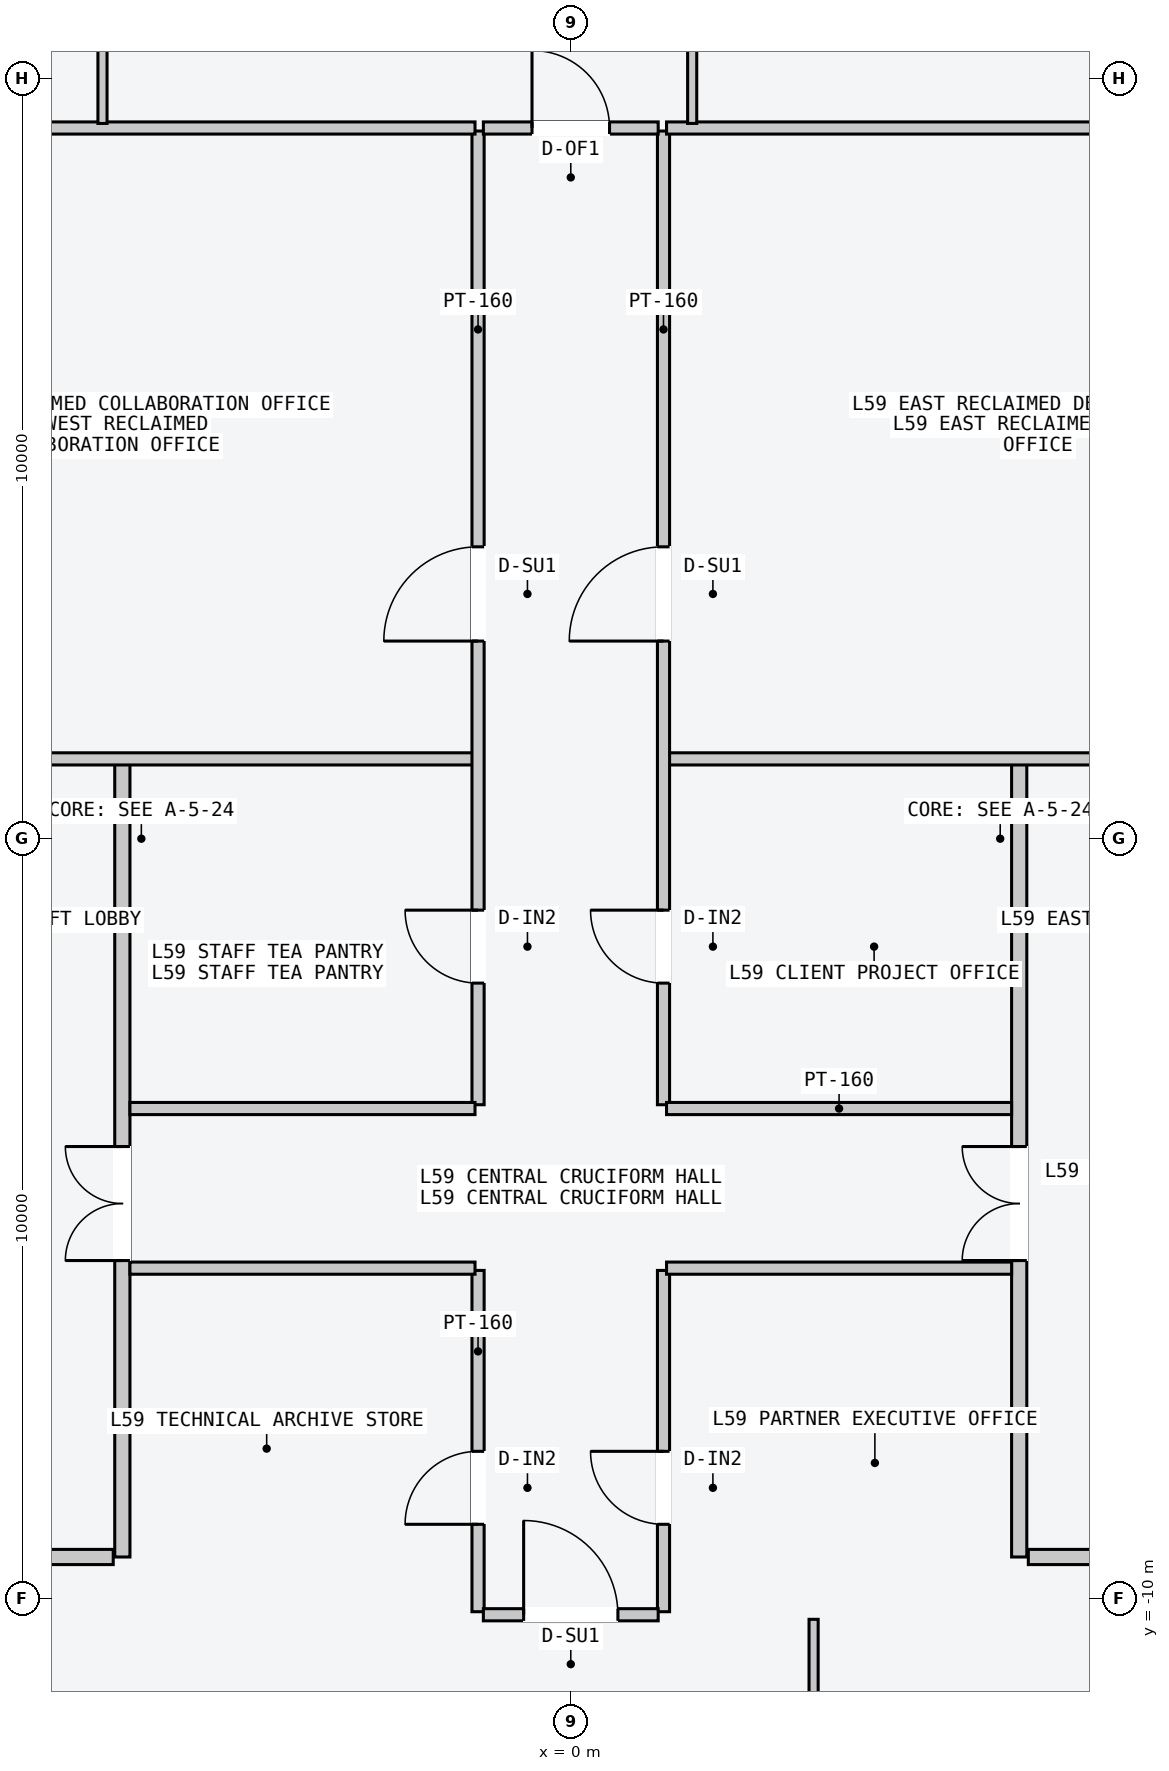
"""IFC4 building model, lengths in metres.
Left out: names, types, materials, properties, quantities, classifications, styles, units other than length and angle.
Written with IfcOpenShell. Run it as: python <this file> out.ifc"""

import sys

from ifc_helpers import new_model, si_unit, direction, frame, frame_2d, origin, place, context, subcontext, project, spatial, rectangle, extrude, element, fill, save


model = new_model("IFC4")
c1 = context("Model", 3, precision=1e-05, world=origin(), true_north=direction((0.0, 1.0)))
c2 = subcontext(c1, "Body", "Model", "MODEL_VIEW")
j1 = project(units=[si_unit("LENGTHUNIT", "METRE"), si_unit("PLANEANGLEUNIT", "RADIAN")], contexts=[c1])
p1 = place(None, origin())
s1 = spatial("IfcSite", under=j1, at=p1, CompositionType="ELEMENT")
p2 = place(p1, origin())
s2 = spatial("IfcBuilding", under=s1, at=p2, CompositionType="ELEMENT")
p3 = place(p2, frame((0.0, 0.0, 225.6)))
s3 = spatial("IfcBuildingStorey", under=s2, at=p3, CompositionType="ELEMENT", Elevation=225.6)
p4 = place(p3, frame((-5.9, -9.45, 0.0), z_axis=(0.0, 0.0, 1.0), x_axis=(0.0, 1.0, 0.0)))
e1 = element("IfcWall", 1, at=p4, inside=s3, PredefinedType="PARTITIONING", context=c2, shape_type="SweptSolid", body=[
    extrude(rectangle(XDim=10.5, YDim=0.2, at=frame_2d((5.25, 0.0))), origin(), (0.0, 0.0, 1.0), 3.4),
])
p5 = place(p4, frame((3.9, 0.0, 0.0)))
e2 = element("IfcOpeningElement", 2, at=p5, cuts=e1, PredefinedType="OPENING", context=c2, shape_type="SweptSolid", body=[
    extrude(rectangle(XDim=1.5, YDim=2.2, at=frame_2d((0.75, 1.1))), frame((0.0, 0.11, 0.0), z_axis=(0.0, -1.0, 0.0), x_axis=(1.0, 0.0, 0.0)), (0.0, 0.0, 1.0), 0.22),
])
p6 = place(p3, frame((-6.02, -9.45, 0.0), z_axis=(0.0, 0.0, 1.0), x_axis=(-1.0, 0.0, 0.0)))
e3 = element("IfcWall", 3, at=p6, inside=s3, PredefinedType="PARTITIONING", context=c2, shape_type="SweptSolid", body=[
    extrude(rectangle(XDim=1.8, YDim=0.2, at=frame_2d((0.9, 0.0))), origin(), (0.0, 0.0, 1.0), 3.4),
])
p7 = place(p3, frame((5.9, -9.45, 0.0), z_axis=(0.0, 0.0, 1.0), x_axis=(0.0, 1.0, 0.0)))
e4 = element("IfcWall", 4, at=p7, inside=s3, PredefinedType="PARTITIONING", context=c2, shape_type="SweptSolid", body=[
    extrude(rectangle(XDim=10.5, YDim=0.2, at=frame_2d((5.25, 0.0))), origin(), (0.0, 0.0, 1.0), 3.4),
])
p8 = place(p7, frame((3.9, 0.0, 0.0)))
e5 = element("IfcOpeningElement", 5, at=p8, cuts=e4, PredefinedType="OPENING", context=c2, shape_type="SweptSolid", body=[
    extrude(rectangle(XDim=1.5, YDim=2.2, at=frame_2d((0.75, 1.1))), frame((0.0, 0.11, 0.0), z_axis=(0.0, -1.0, 0.0), x_axis=(1.0, 0.0, 0.0)), (0.0, 0.0, 1.0), 0.22),
])
p9 = place(p3, frame((6.02, -9.45, 0.0), z_axis=(0.0, 0.0, 1.0), x_axis=(1.0, 0.0, 0.0)))
e6 = element("IfcWall", 6, at=p9, inside=s3, PredefinedType="PARTITIONING", context=c2, shape_type="SweptSolid", body=[
    extrude(rectangle(XDim=1.8, YDim=0.2, at=frame_2d((0.9, 0.0))), origin(), (0.0, 0.0, 1.0), 3.4),
])
p10 = place(p3, frame((-10.05, 1.05, 0.0), z_axis=(0.0, 0.0, 1.0), x_axis=(1.0, 0.0, 0.0)))
e7 = element("IfcWall", 7, at=p10, inside=s3, PredefinedType="PARTITIONING", context=c2, shape_type="SweptSolid", body=[
    extrude(rectangle(XDim=8.79, YDim=0.16, at=frame_2d((4.395, 0.0))), origin(), (0.0, 0.0, 1.0), 3.4),
])
p11 = place(p3, frame((-1.22, -3.5, 0.0), z_axis=(0.0, 0.0, 1.0), x_axis=(0.0, 1.0, 0.0)))
e8 = element("IfcWall", 8, at=p11, inside=s3, PredefinedType="PARTITIONING", context=c2, shape_type="SweptSolid", body=[
    extrude(rectangle(XDim=12.81, YDim=0.16, at=frame_2d((6.405, 0.0))), origin(), (0.0, 0.0, 1.0), 3.4),
])
p12 = place(p11, frame((6.1, 0.0, 0.0)))
e9 = element("IfcOpeningElement", 9, at=p12, cuts=e8, PredefinedType="OPENING", context=c2, shape_type="SweptSolid", body=[
    extrude(rectangle(XDim=1.24, YDim=2.24, at=frame_2d((0.62, 1.12))), frame((0.0, 0.09, 0.0), z_axis=(0.0, -1.0, 0.0), x_axis=(1.0, 0.0, 0.0)), (0.0, 0.0, 1.0), 0.18),
])
p13 = place(p11, frame((1.6, 0.0, 0.0)))
e10 = element("IfcOpeningElement", 10, at=p13, cuts=e8, PredefinedType="OPENING", context=c2, shape_type="SweptSolid", body=[
    extrude(rectangle(XDim=0.96, YDim=2.18, at=frame_2d((0.48, 1.09))), frame((0.0, 0.09, 0.0), z_axis=(0.0, -1.0, 0.0), x_axis=(1.0, 0.0, 0.0)), (0.0, 0.0, 1.0), 0.18),
])
p14 = place(p3, frame((-7.5, 9.35, 0.0), z_axis=(0.0, 0.0, 1.0), x_axis=(1.0, 0.0, 0.0)))
e11 = element("IfcWall", 11, at=p14, inside=s3, PredefinedType="PARTITIONING", context=c2, shape_type="SweptSolid", body=[
    extrude(rectangle(XDim=6.24, YDim=0.16, at=frame_2d((3.12, 0.0))), origin(), (0.0, 0.0, 1.0), 3.4),
])
p15 = place(p3, frame((-5.8, -3.55, 0.0), z_axis=(0.0, 0.0, 1.0), x_axis=(1.0, 0.0, 0.0)))
e12 = element("IfcWall", 12, at=p15, inside=s3, PredefinedType="PARTITIONING", context=c2, shape_type="SweptSolid", body=[
    extrude(rectangle(XDim=4.54, YDim=0.16, at=frame_2d((2.27, 0.0))), origin(), (0.0, 0.0, 1.0), 3.4),
])
p16 = place(p3, frame((1.26, 1.05, 0.0), z_axis=(0.0, 0.0, 1.0), x_axis=(1.0, 0.0, 0.0)))
e13 = element("IfcWall", 13, at=p16, inside=s3, PredefinedType="PARTITIONING", context=c2, shape_type="SweptSolid", body=[
    extrude(rectangle(XDim=8.8, YDim=0.16, at=frame_2d((4.4, 0.0))), origin(), (0.0, 0.0, 1.0), 3.4),
])
p17 = place(p3, frame((1.22, -3.5, 0.0), z_axis=(0.0, 0.0, 1.0), x_axis=(0.0, 1.0, 0.0)))
e14 = element("IfcWall", 14, at=p17, inside=s3, PredefinedType="PARTITIONING", context=c2, shape_type="SweptSolid", body=[
    extrude(rectangle(XDim=12.81, YDim=0.16, at=frame_2d((6.405, 0.0))), origin(), (0.0, 0.0, 1.0), 3.4),
])
p18 = place(p17, frame((6.1, 0.0, 0.0)))
e15 = element("IfcOpeningElement", 15, at=p18, cuts=e14, PredefinedType="OPENING", context=c2, shape_type="SweptSolid", body=[
    extrude(rectangle(XDim=1.24, YDim=2.24, at=frame_2d((0.62, 1.12))), frame((0.0, 0.09, 0.0), z_axis=(0.0, -1.0, 0.0), x_axis=(1.0, 0.0, 0.0)), (0.0, 0.0, 1.0), 0.18),
])
p19 = place(p17, frame((1.6, 0.0, 0.0)))
e16 = element("IfcOpeningElement", 16, at=p19, cuts=e14, PredefinedType="OPENING", context=c2, shape_type="SweptSolid", body=[
    extrude(rectangle(XDim=0.96, YDim=2.18, at=frame_2d((0.48, 1.09))), frame((0.0, 0.09, 0.0), z_axis=(0.0, -1.0, 0.0), x_axis=(1.0, 0.0, 0.0)), (0.0, 0.0, 1.0), 0.18),
])
p20 = place(p3, frame((1.26, 9.35, 0.0), z_axis=(0.0, 0.0, 1.0), x_axis=(1.0, 0.0, 0.0)))
e17 = element("IfcWall", 17, at=p20, inside=s3, PredefinedType="PARTITIONING", context=c2, shape_type="SweptSolid", body=[
    extrude(rectangle(XDim=6.24, YDim=0.16, at=frame_2d((3.12, 0.0))), origin(), (0.0, 0.0, 1.0), 3.4),
])
p21 = place(p3, frame((1.26, -3.55, 0.0), z_axis=(0.0, 0.0, 1.0), x_axis=(1.0, 0.0, 0.0)))
e18 = element("IfcWall", 18, at=p21, inside=s3, PredefinedType="PARTITIONING", context=c2, shape_type="SweptSolid", body=[
    extrude(rectangle(XDim=4.54, YDim=0.16, at=frame_2d((2.27, 0.0))), origin(), (0.0, 0.0, 1.0), 3.4),
])
p22 = place(p3, frame((-1.22, -10.17, 0.0), z_axis=(0.0, 0.0, 1.0), x_axis=(0.0, 1.0, 0.0)))
e19 = element("IfcWall", 19, at=p22, inside=s3, PredefinedType="PARTITIONING", context=c2, shape_type="SweptSolid", body=[
    extrude(rectangle(XDim=4.49, YDim=0.16, at=frame_2d((2.245, 0.0))), origin(), (0.0, 0.0, 1.0), 3.4),
])
p23 = place(p22, frame((1.15, 0.0, 0.0)))
e20 = element("IfcOpeningElement", 20, at=p23, cuts=e19, PredefinedType="OPENING", context=c2, shape_type="SweptSolid", body=[
    extrude(rectangle(XDim=0.96, YDim=2.18, at=frame_2d((0.48, 1.09))), frame((0.0, 0.09, 0.0), z_axis=(0.0, -1.0, 0.0), x_axis=(1.0, 0.0, 0.0)), (0.0, 0.0, 1.0), 0.18),
])
p24 = place(p3, frame((1.22, -10.17, 0.0), z_axis=(0.0, 0.0, 1.0), x_axis=(0.0, 1.0, 0.0)))
e21 = element("IfcWall", 21, at=p24, inside=s3, PredefinedType="PARTITIONING", context=c2, shape_type="SweptSolid", body=[
    extrude(rectangle(XDim=4.49, YDim=0.16, at=frame_2d((2.245, 0.0))), origin(), (0.0, 0.0, 1.0), 3.4),
])
p25 = place(p24, frame((1.15, 0.0, 0.0)))
e22 = element("IfcOpeningElement", 22, at=p25, cuts=e21, PredefinedType="OPENING", context=c2, shape_type="SweptSolid", body=[
    extrude(rectangle(XDim=0.96, YDim=2.18, at=frame_2d((0.48, 1.09))), frame((0.0, 0.09, 0.0), z_axis=(0.0, -1.0, 0.0), x_axis=(1.0, 0.0, 0.0)), (0.0, 0.0, 1.0), 0.18),
])
for number, where, z_axis, x_axis in (
    (23, (-5.8, -5.65, 0.0), (0.0, 0.0, 1.0), (1.0, 0.0, 0.0)),
    (24, (1.26, -5.65, 0.0), (0.0, 0.0, 1.0), (1.0, 0.0, 0.0)),
):
    element("IfcWall", number, at=place(p3, frame(where, z_axis=z_axis, x_axis=x_axis)), inside=s3, PredefinedType="PARTITIONING", context=c2, shape_type="SweptSolid", body=[
        extrude(rectangle(XDim=4.54, YDim=0.16, at=frame_2d((2.27, 0.0))), origin(), (0.0, 0.0, 1.0), 3.4),
    ])
p26 = place(p3, frame((-6.161, 9.41, 0.0), z_axis=(0.0, 0.0, 1.0), x_axis=(0.0, 1.0, 0.0)))
e25 = element("IfcWall", 25, at=p26, inside=s3, PredefinedType="PARTITIONING", context=c2, shape_type="SweptSolid", body=[
    extrude(rectangle(XDim=8.15, YDim=0.12, at=frame_2d((4.075, 0.0))), origin(), (0.0, 0.0, 1.0), 3.4),
])
p27 = place(p26, frame((1.15, 0.0, 0.0)))
e26 = element("IfcOpeningElement", 26, at=p27, cuts=e25, PredefinedType="OPENING", context=c2, shape_type="SweptSolid", body=[
    extrude(rectangle(XDim=0.96, YDim=2.18, at=frame_2d((0.48, 1.09))), frame((0.0, 0.07, 0.0), z_axis=(0.0, -1.0, 0.0), x_axis=(1.0, 0.0, 0.0)), (0.0, 0.0, 1.0), 0.14),
])
p28 = place(p3, frame((1.597, 9.41, 0.0), z_axis=(0.0, 0.0, 1.0), x_axis=(0.0, 1.0, 0.0)))
e27 = element("IfcWall", 27, at=p28, inside=s3, PredefinedType="PARTITIONING", context=c2, shape_type="SweptSolid", body=[
    extrude(rectangle(XDim=7.14, YDim=0.12, at=frame_2d((3.57, 0.0))), origin(), (0.0, 0.0, 1.0), 3.4),
])
p29 = place(p28, frame((1.15, 0.0, 0.0)))
e28 = element("IfcOpeningElement", 28, at=p29, cuts=e27, PredefinedType="OPENING", context=c2, shape_type="SweptSolid", body=[
    extrude(rectangle(XDim=0.96, YDim=2.18, at=frame_2d((0.48, 1.09))), frame((0.0, 0.07, 0.0), z_axis=(0.0, -1.0, 0.0), x_axis=(1.0, 0.0, 0.0)), (0.0, 0.0, 1.0), 0.14),
])
p30 = place(p3, frame((-1.15, 9.35, 0.0), z_axis=(0.0, 0.0, 1.0), x_axis=(1.0, 0.0, 0.0)))
e29 = element("IfcWall", 29, at=p30, inside=s3, PredefinedType="PARTITIONING", context=c2, shape_type="SweptSolid", body=[
    extrude(rectangle(XDim=2.3, YDim=0.16, at=frame_2d((1.15, 0.0))), origin(), (0.0, 0.0, 1.0), 3.4),
])
p31 = place(p30, frame((0.64, 0.0, 0.0)))
e30 = element("IfcOpeningElement", 30, at=p31, cuts=e29, PredefinedType="OPENING", context=c2, shape_type="SweptSolid", body=[
    extrude(rectangle(XDim=1.02, YDim=2.2, at=frame_2d((0.51, 1.1))), frame((0.0, 0.09, 0.0), z_axis=(0.0, -1.0, 0.0), x_axis=(1.0, 0.0, 0.0)), (0.0, 0.0, 1.0), 0.18),
])
p32 = place(p3, frame((3.195, -17.56, 0.0), z_axis=(0.0, 0.0, 1.0), x_axis=(0.0, 1.0, 0.0)))
e31 = element("IfcWall", 31, at=p32, inside=s3, PredefinedType="PARTITIONING", context=c2, shape_type="SweptSolid", body=[
    extrude(rectangle(XDim=7.29, YDim=0.12, at=frame_2d((3.645, 0.0))), origin(), (0.0, 0.0, 1.0), 3.4),
])
p33 = place(p32, frame((1.05, 0.0, 0.0)))
e32 = element("IfcOpeningElement", 32, at=p33, cuts=e31, PredefinedType="OPENING", context=c2, shape_type="SweptSolid", body=[
    extrude(rectangle(XDim=0.96, YDim=2.18, at=frame_2d((0.48, 1.09))), frame((0.0, 0.07, 0.0), z_axis=(0.0, -1.0, 0.0), x_axis=(1.0, 0.0, 0.0)), (0.0, 0.0, 1.0), 0.14),
])
p34 = place(p3, frame((-1.15, -10.21, 0.0), z_axis=(0.0, 0.0, 1.0), x_axis=(1.0, 0.0, 0.0)))
e33 = element("IfcWall", 33, at=p34, inside=s3, PredefinedType="PARTITIONING", context=c2, shape_type="SweptSolid", body=[
    extrude(rectangle(XDim=2.3, YDim=0.16, at=frame_2d((1.15, 0.0))), origin(), (0.0, 0.0, 1.0), 3.4),
])
p35 = place(p34, frame((0.53, 0.0, 0.0)))
e34 = element("IfcOpeningElement", 34, at=p35, cuts=e33, PredefinedType="OPENING", context=c2, shape_type="SweptSolid", body=[
    extrude(rectangle(XDim=1.24, YDim=2.24, at=frame_2d((0.62, 1.12))), frame((0.0, 0.09, 0.0), z_axis=(0.0, -1.0, 0.0), x_axis=(1.0, 0.0, 0.0)), (0.0, 0.0, 1.0), 0.18),
])
p36 = place(p5, origin())
e35 = element("IfcDoor", 35, at=p36, inside=s3, OperationType="DOUBLE_DOOR_SINGLE_SWING", PredefinedType="DOOR", context=c2, shape_type="SweptSolid", body=[
    extrude(rectangle(XDim=1.5, YDim=2.2, at=frame_2d((0.75, 1.1))), frame((0.0, 0.025, 0.0), z_axis=(0.0, -1.0, 0.0), x_axis=(1.0, 0.0, 0.0)), (0.0, 0.0, 1.0), 0.05),
])
fill(e2, e35)
p37 = place(p8, origin())
e36 = element("IfcDoor", 36, at=p37, inside=s3, OperationType="DOUBLE_DOOR_SINGLE_SWING", PredefinedType="DOOR", context=c2, shape_type="SweptSolid", body=[
    extrude(rectangle(XDim=1.5, YDim=2.2, at=frame_2d((0.75, 1.1))), frame((0.0, 0.025, 0.0), z_axis=(0.0, -1.0, 0.0), x_axis=(1.0, 0.0, 0.0)), (0.0, 0.0, 1.0), 0.05),
])
fill(e5, e36)
p38 = place(p12, origin())
e37 = element("IfcDoor", 37, at=p38, inside=s3, OperationType="SINGLE_SWING_LEFT", PredefinedType="DOOR", context=c2, shape_type="SweptSolid", body=[
    extrude(rectangle(XDim=1.24, YDim=2.24, at=frame_2d((0.62, 1.12))), frame((0.0, 0.025, 0.0), z_axis=(0.0, -1.0, 0.0), x_axis=(1.0, 0.0, 0.0)), (0.0, 0.0, 1.0), 0.05),
])
fill(e9, e37)
p39 = place(p13, origin())
e38 = element("IfcDoor", 38, at=p39, inside=s3, OperationType="SINGLE_SWING_RIGHT", PredefinedType="DOOR", context=c2, shape_type="SweptSolid", body=[
    extrude(rectangle(XDim=0.96, YDim=2.18, at=frame_2d((0.48, 1.09))), frame((0.0, 0.025, 0.0), z_axis=(0.0, -1.0, 0.0), x_axis=(1.0, 0.0, 0.0)), (0.0, 0.0, 1.0), 0.05),
])
fill(e10, e38)
p40 = place(p18, origin())
e39 = element("IfcDoor", 39, at=p40, inside=s3, OperationType="SINGLE_SWING_LEFT", PredefinedType="DOOR", context=c2, shape_type="SweptSolid", body=[
    extrude(rectangle(XDim=1.24, YDim=2.24, at=frame_2d((0.62, 1.12))), frame((0.0, 0.025, 0.0), z_axis=(0.0, -1.0, 0.0), x_axis=(1.0, 0.0, 0.0)), (0.0, 0.0, 1.0), 0.05),
])
fill(e15, e39)
p41 = place(p19, origin())
e40 = element("IfcDoor", 40, at=p41, inside=s3, OperationType="SINGLE_SWING_RIGHT", PredefinedType="DOOR", context=c2, shape_type="SweptSolid", body=[
    extrude(rectangle(XDim=0.96, YDim=2.18, at=frame_2d((0.48, 1.09))), frame((0.0, 0.025, 0.0), z_axis=(0.0, -1.0, 0.0), x_axis=(1.0, 0.0, 0.0)), (0.0, 0.0, 1.0), 0.05),
])
fill(e16, e40)
p42 = place(p23, origin())
e41 = element("IfcDoor", 41, at=p42, inside=s3, OperationType="SINGLE_SWING_LEFT", PredefinedType="DOOR", context=c2, shape_type="SweptSolid", body=[
    extrude(rectangle(XDim=0.96, YDim=2.18, at=frame_2d((0.48, 1.09))), frame((0.0, 0.025, 0.0), z_axis=(0.0, -1.0, 0.0), x_axis=(1.0, 0.0, 0.0)), (0.0, 0.0, 1.0), 0.05),
])
fill(e20, e41)
p43 = place(p25, origin())
e42 = element("IfcDoor", 42, at=p43, inside=s3, OperationType="SINGLE_SWING_RIGHT", PredefinedType="DOOR", context=c2, shape_type="SweptSolid", body=[
    extrude(rectangle(XDim=0.96, YDim=2.18, at=frame_2d((0.48, 1.09))), frame((0.0, 0.025, 0.0), z_axis=(0.0, -1.0, 0.0), x_axis=(1.0, 0.0, 0.0)), (0.0, 0.0, 1.0), 0.05),
])
fill(e22, e42)
p44 = place(p31, origin())
e43 = element("IfcDoor", 43, at=p44, inside=s3, OperationType="SINGLE_SWING_LEFT", PredefinedType="DOOR", context=c2, shape_type="SweptSolid", body=[
    extrude(rectangle(XDim=1.02, YDim=2.2, at=frame_2d((0.51, 1.1))), frame((0.0, 0.025, 0.0), z_axis=(0.0, -1.0, 0.0), x_axis=(1.0, 0.0, 0.0)), (0.0, 0.0, 1.0), 0.05),
])
fill(e30, e43)
p45 = place(p35, origin())
e44 = element("IfcDoor", 44, at=p45, inside=s3, OperationType="SINGLE_SWING_LEFT", PredefinedType="DOOR", context=c2, shape_type="SweptSolid", body=[
    extrude(rectangle(XDim=1.24, YDim=2.24, at=frame_2d((0.62, 1.12))), frame((0.0, 0.025, 0.0), z_axis=(0.0, -1.0, 0.0), x_axis=(1.0, 0.0, 0.0)), (0.0, 0.0, 1.0), 0.05),
])
fill(e34, e44)
save(model, sys.argv[1])
